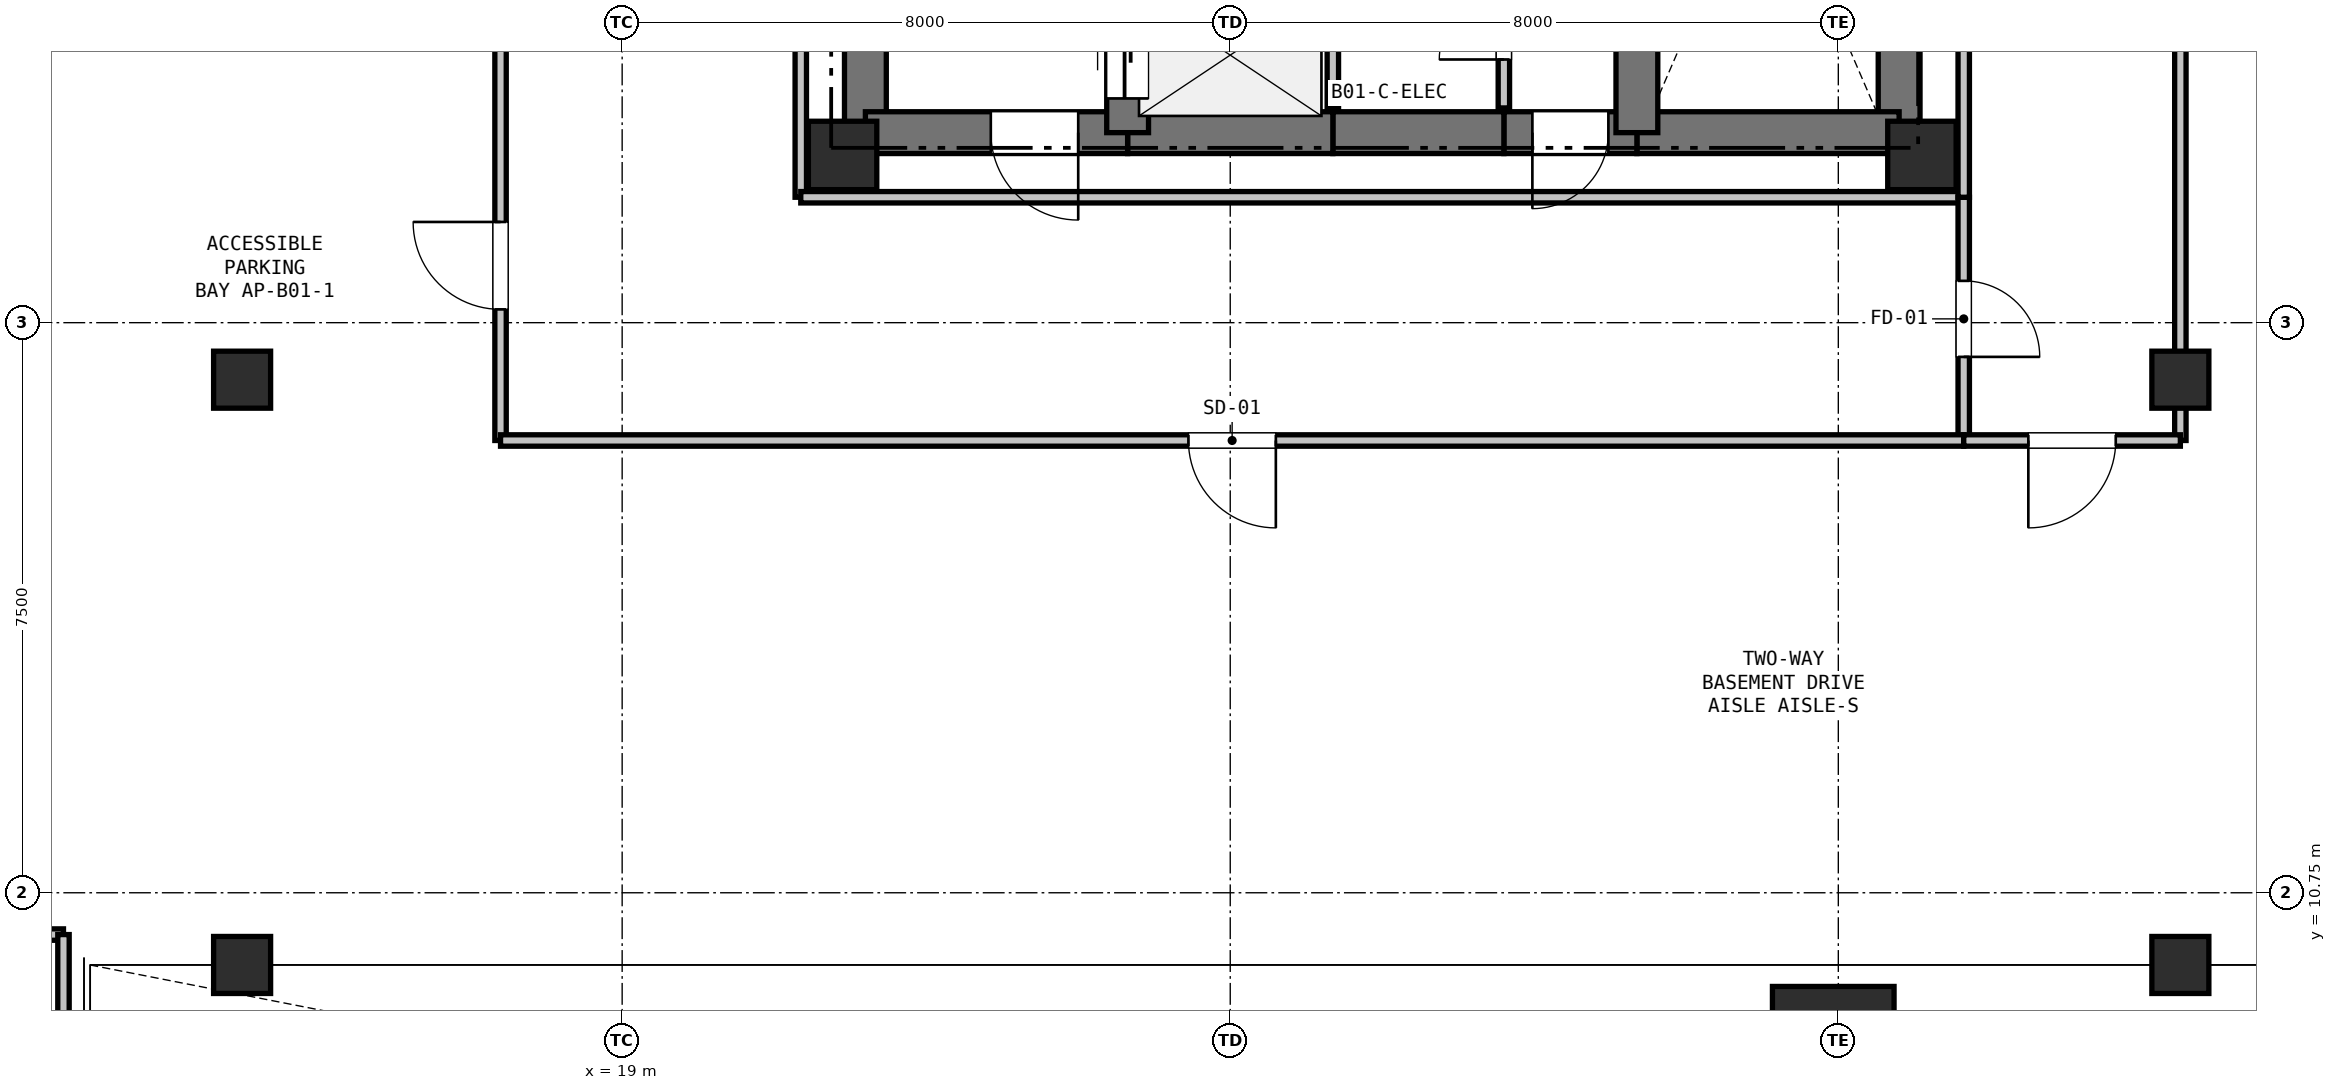
"""IFC4 building model, lengths in metres.
Left out: names, types, materials, properties, quantities, classifications, styles, units other than length and angle.
Written with IfcOpenShell. Run it as: python <this file> out.ifc"""

import sys

from ifc_helpers import new_model, si_unit, direction, frame, frame_2d, origin, origin_2d, place, context, subcontext, project, spatial, rectangle, hollow_rectangle, extrude, element, fill, save


model = new_model("IFC4")
c1 = context("Model", 3, precision=1e-05, world=origin(), true_north=direction((0.0, 1.0)))
c2 = subcontext(c1, "Body", "Model", "MODEL_VIEW")
j1 = project(units=[si_unit("LENGTHUNIT", "METRE"), si_unit("PLANEANGLEUNIT", "RADIAN")], contexts=[c1])
p1 = place(None, origin())
s1 = spatial("IfcSite", under=j1, at=p1, CompositionType="ELEMENT")
p2 = place(p1, origin())
s2 = spatial("IfcBuilding", under=s1, at=p2, CompositionType="ELEMENT")
p3 = place(p2, frame((0.0, 0.0, -4.5)))
s3 = spatial("IfcBuildingStorey", under=s2, at=p3, CompositionType="ELEMENT", Elevation=-4.5)
p4 = place(p3, frame((34.933, 8.717, 0.0), z_axis=(0.0, 0.0, 1.0), x_axis=(1.0, 0.0, 0.0)))
e1 = element("IfcColumn", 1, at=p4, inside=s3, PredefinedType="COLUMN", context=c2, shape_type="SweptSolid", body=[
    extrude(hollow_rectangle(XDim=1.6, YDim=1.6, WallThickness=0.04, at=origin_2d()), origin(), (0.0, 0.0, 1.0), 4.5),
])
for number, where, z_axis, x_axis in (
    (2, (14.0, 9.8, 0.0), (0.0, 0.0, 1.0), (1.0, 0.0, 0.0)),
    (3, (14.0, 17.5, 0.0), (0.0, 0.0, 1.0), (1.0, 0.0, 0.0)),
    (4, (39.5, 9.8, 0.0), (0.0, 0.0, 1.0), (1.0, 0.0, 0.0)),
    (5, (39.5, 17.5, 0.0), (0.0, 0.0, 1.0), (1.0, 0.0, 0.0)),
):
    element("IfcColumn", number, at=place(p3, frame(where, z_axis=z_axis, x_axis=x_axis)), inside=s3, PredefinedType="COLUMN", context=c2, shape_type="SweptSolid", body=[
        extrude(rectangle(XDim=0.75, YDim=0.75, at=origin_2d()), origin(), (0.0, 0.0, 1.0), 4.5),
    ])
for number, where, z_axis, x_axis in (
    (6, (21.9, 20.45, 0.0), (0.0, 0.0, 1.0), (1.0, 0.0, 0.0)),
    (7, (36.1, 20.45, 0.0), (0.0, 0.0, 1.0), (1.0, 0.0, 0.0)),
):
    element("IfcColumn", number, at=place(p3, frame(where, z_axis=z_axis, x_axis=x_axis)), inside=s3, PredefinedType="COLUMN", context=c2, shape_type="SweptSolid", body=[
        extrude(rectangle(XDim=0.9, YDim=0.9, at=origin_2d()), origin(), (0.0, 0.0, 1.0), 4.5),
    ])
p5 = place(p3, frame((22.2, 20.75, 0.0), z_axis=(0.0, 0.0, 1.0), x_axis=(0.0, 1.0, 0.0)))
e8 = element("IfcWall", 8, at=p5, inside=s3, PredefinedType="SHEAR", context=c2, shape_type="SweptSolid", body=[
    extrude(rectangle(XDim=4.65, YDim=0.55, at=frame_2d((2.325, 0.0))), origin(), (0.0, 0.0, 1.0), 4.2),
])
p6 = place(p3, frame((35.8, 28.1, 0.0), z_axis=(0.0, 0.0, 1.0), x_axis=(0.0, -1.0, 0.0)))
e9 = element("IfcWall", 9, at=p6, inside=s3, PredefinedType="SHEAR", context=c2, shape_type="SweptSolid", body=[
    extrude(rectangle(XDim=7.35, YDim=0.55, at=frame_2d((3.675, 0.0))), origin(), (0.0, 0.0, 1.0), 4.2),
])
p7 = place(p3, frame((35.8, 20.75, 0.0), z_axis=(0.0, 0.0, 1.0), x_axis=(-1.0, 0.0, 0.0)))
e10 = element("IfcWall", 10, at=p7, inside=s3, PredefinedType="SHEAR", context=c2, shape_type="SweptSolid", body=[
    extrude(rectangle(XDim=3.45, YDim=0.55, at=frame_2d((1.725, 0.0))), origin(), (0.0, 0.0, 1.0), 4.2),
])
p8 = place(p3, frame((32.35, 20.75, 0.0), z_axis=(0.0, 0.0, 1.0), x_axis=(-1.0, 0.0, 0.0)))
e11 = element("IfcWall", 11, at=p8, inside=s3, PredefinedType="SHEAR", context=c2, shape_type="SweptSolid", body=[
    extrude(rectangle(XDim=1.75, YDim=0.55, at=frame_2d((0.875, 0.0))), origin(), (0.0, 0.0, 1.0), 4.2),
])
p9 = place(p8, frame((0.375, 0.0, 0.0)))
e12 = element("IfcOpeningElement", 12, at=p9, cuts=e11, PredefinedType="OPENING", context=c2, shape_type="SweptSolid", body=[
    extrude(rectangle(XDim=1.0, YDim=2.15, at=frame_2d((0.5, 1.075))), frame((0.0, 0.285, 0.0), z_axis=(0.0, -1.0, 0.0), x_axis=(1.0, 0.0, 0.0)), (0.0, 0.0, 1.0), 0.57),
])
p10 = place(p3, frame((30.6, 20.75, 0.0), z_axis=(0.0, 0.0, 1.0), x_axis=(-1.0, 0.0, 0.0)))
e13 = element("IfcWall", 13, at=p10, inside=s3, PredefinedType="SHEAR", context=c2, shape_type="SweptSolid", body=[
    extrude(rectangle(XDim=2.25, YDim=0.55, at=frame_2d((1.125, 0.0))), origin(), (0.0, 0.0, 1.0), 4.2),
])
p11 = place(p3, frame((28.35, 20.75, 0.0), z_axis=(0.0, 0.0, 1.0), x_axis=(-1.0, 0.0, 0.0)))
e14 = element("IfcWall", 14, at=p11, inside=s3, PredefinedType="SHEAR", context=c2, shape_type="SweptSolid", body=[
    extrude(rectangle(XDim=2.7, YDim=0.55, at=frame_2d((1.35, 0.0))), origin(), (0.0, 0.0, 1.0), 4.2),
])
p12 = place(p3, frame((25.65, 20.75, 0.0), z_axis=(0.0, 0.0, 1.0), x_axis=(-1.0, 0.0, 0.0)))
e15 = element("IfcWall", 15, at=p12, inside=s3, PredefinedType="SHEAR", context=c2, shape_type="SweptSolid", body=[
    extrude(rectangle(XDim=3.45, YDim=0.55, at=frame_2d((1.725, 0.0))), origin(), (0.0, 0.0, 1.0), 4.2),
])
p13 = place(p12, frame((0.65, 0.0, 0.0)))
e16 = element("IfcOpeningElement", 16, at=p13, cuts=e15, PredefinedType="OPENING", context=c2, shape_type="SweptSolid", body=[
    extrude(rectangle(XDim=1.15, YDim=2.15, at=frame_2d((0.575, 1.075))), frame((0.0, 0.285, 0.0), z_axis=(0.0, -1.0, 0.0), x_axis=(1.0, 0.0, 0.0)), (0.0, 0.0, 1.0), 0.57),
])
p14 = place(p3, frame((25.65, 20.75, 0.0), z_axis=(0.0, 0.0, 1.0), x_axis=(0.0, 1.0, 0.0)))
e17 = element("IfcWall", 17, at=p14, inside=s3, PredefinedType="SHEAR", context=c2, shape_type="SweptSolid", body=[
    extrude(rectangle(XDim=2.0, YDim=0.55, at=frame_2d((1.0, 0.0))), origin(), (0.0, 0.0, 1.0), 4.2),
])
p15 = place(p14, frame((0.45, 0.0, 0.0)))
e18 = element("IfcOpeningElement", 18, at=p15, cuts=e17, PredefinedType="OPENING", context=c2, shape_type="SweptSolid", body=[
    extrude(rectangle(XDim=1.1, YDim=2.15, at=frame_2d((0.55, 1.075))), frame((0.0, 0.285, 0.0), z_axis=(0.0, -1.0, 0.0), x_axis=(1.0, 0.0, 0.0)), (0.0, 0.0, 1.0), 0.57),
])
p16 = place(p3, frame((32.35, 20.75, 0.0), z_axis=(0.0, 0.0, 1.0), x_axis=(0.0, 1.0, 0.0)))
e19 = element("IfcWall", 19, at=p16, inside=s3, PredefinedType="SHEAR", context=c2, shape_type="SweptSolid", body=[
    extrude(rectangle(XDim=4.8, YDim=0.55, at=frame_2d((2.4, 0.0))), origin(), (0.0, 0.0, 1.0), 4.2),
])
p17 = place(p3, frame((28.35, 23.2, 0.0), z_axis=(0.0, 0.0, 1.0), x_axis=(0.0, -1.0, 0.0)))
e20 = element("IfcWall", 20, at=p17, inside=s3, PredefinedType="PARTITIONING", context=c2, shape_type="SweptSolid", body=[
    extrude(rectangle(XDim=2.125, YDim=0.15, at=frame_2d((1.062, 0.0))), origin(), (0.0, 0.0, 1.0), 4.2),
])
p18 = place(p3, frame((30.6, 21.075, 0.0), z_axis=(0.0, 0.0, 1.0), x_axis=(0.0, 1.0, 0.0)))
e21 = element("IfcWall", 21, at=p18, inside=s3, PredefinedType="PARTITIONING", context=c2, shape_type="SweptSolid", body=[
    extrude(rectangle(XDim=2.125, YDim=0.15, at=frame_2d((1.062, 0.0))), origin(), (0.0, 0.0, 1.0), 4.2),
])
p19 = place(p18, frame((0.637, 0.0, 0.0)))
e22 = element("IfcOpeningElement", 22, at=p19, cuts=e21, PredefinedType="OPENING", context=c2, shape_type="SweptSolid", body=[
    extrude(rectangle(XDim=0.85, YDim=2.1, at=frame_2d((0.425, 1.05))), frame((0.0, 0.085, 0.0), z_axis=(0.0, -1.0, 0.0), x_axis=(1.0, 0.0, 0.0)), (0.0, 0.0, 1.0), 0.17),
])
p20 = place(p3, frame((17.4, 16.7, 0.0), z_axis=(0.0, 0.0, 1.0), x_axis=(0.0, 1.0, 0.0)))
e23 = element("IfcWall", 23, at=p20, inside=s3, PredefinedType="PARTITIONING", context=c2, shape_type="SweptSolid", body=[
    extrude(rectangle(XDim=18.7, YDim=0.15, at=frame_2d((9.35, 0.0))), origin(), (0.0, 0.0, 1.0), 4.2),
])
p21 = place(p20, frame((1.725, 0.0, 0.0)))
e24 = element("IfcOpeningElement", 24, at=p21, cuts=e23, PredefinedType="OPENING", context=c2, shape_type="SweptSolid", body=[
    extrude(rectangle(XDim=1.15, YDim=2.15, at=frame_2d((0.575, 1.075))), frame((0.0, 0.085, 0.0), z_axis=(0.0, -1.0, 0.0), x_axis=(1.0, 0.0, 0.0)), (0.0, 0.0, 1.0), 0.17),
])
p22 = place(p20, frame((5.347, 0.0, 0.0)))
e25 = element("IfcOpeningElement", 25, at=p22, cuts=e23, PredefinedType="OPENING", context=c2, shape_type="SweptSolid", body=[
    extrude(rectangle(XDim=1.15, YDim=2.15, at=frame_2d((0.575, 1.075))), frame((0.0, 0.085, 0.0), z_axis=(0.0, -1.0, 0.0), x_axis=(1.0, 0.0, 0.0)), (0.0, 0.0, 1.0), 0.17),
])
p23 = place(p3, frame((21.35, 25.25, 0.0), z_axis=(0.0, 0.0, 1.0), x_axis=(0.0, -1.0, 0.0)))
e26 = element("IfcWall", 26, at=p23, inside=s3, PredefinedType="PARTITIONING", context=c2, shape_type="SweptSolid", body=[
    extrude(rectangle(XDim=5.35, YDim=0.15, at=frame_2d((2.675, 0.0))), origin(), (0.0, 0.0, 1.0), 4.2),
])
p24 = place(p3, frame((21.35, 19.9, 0.0), z_axis=(0.0, 0.0, 1.0), x_axis=(1.0, 0.0, 0.0)))
e27 = element("IfcWall", 27, at=p24, inside=s3, PredefinedType="PARTITIONING", context=c2, shape_type="SweptSolid", body=[
    extrude(rectangle(XDim=15.3, YDim=0.15, at=frame_2d((7.65, 0.0))), origin(), (0.0, 0.0, 1.0), 4.2),
])
p25 = place(p3, frame((36.65, 19.9, 0.0), z_axis=(0.0, 0.0, 1.0), x_axis=(0.0, -1.0, 0.0)))
e28 = element("IfcWall", 28, at=p25, inside=s3, PredefinedType="PARTITIONING", context=c2, shape_type="SweptSolid", body=[
    extrude(rectangle(XDim=3.2, YDim=0.15, at=frame_2d((1.6, 0.0))), origin(), (0.0, 0.0, 1.0), 4.2),
])
p26 = place(p25, frame((1.1, 0.0, 0.0)))
e29 = element("IfcOpeningElement", 29, at=p26, cuts=e28, PredefinedType="OPENING", context=c2, shape_type="SweptSolid", body=[
    extrude(rectangle(XDim=1.0, YDim=2.15, at=frame_2d((0.5, 1.075))), frame((0.0, 0.085, 0.0), z_axis=(0.0, -1.0, 0.0), x_axis=(1.0, 0.0, 0.0)), (0.0, 0.0, 1.0), 0.17),
])
p27 = place(p3, frame((36.65, 16.7, 0.0), z_axis=(0.0, 0.0, 1.0), x_axis=(-1.0, 0.0, 0.0)))
e30 = element("IfcWall", 30, at=p27, inside=s3, PredefinedType="PARTITIONING", context=c2, shape_type="SweptSolid", body=[
    extrude(rectangle(XDim=19.25, YDim=0.15, at=frame_2d((9.625, 0.0))), origin(), (0.0, 0.0, 1.0), 4.2),
])
p28 = place(p27, frame((9.05, 0.0, 0.0)))
e31 = element("IfcOpeningElement", 31, at=p28, cuts=e30, PredefinedType="OPENING", context=c2, shape_type="SweptSolid", body=[
    extrude(rectangle(XDim=1.15, YDim=2.15, at=frame_2d((0.575, 1.075))), frame((0.0, 0.085, 0.0), z_axis=(0.0, -1.0, 0.0), x_axis=(1.0, 0.0, 0.0)), (0.0, 0.0, 1.0), 0.17),
])
p29 = place(p3, frame((39.5, 36.8, 0.0), z_axis=(0.0, 0.0, 1.0), x_axis=(0.0, -1.0, 0.0)))
e32 = element("IfcWall", 32, at=p29, inside=s3, PredefinedType="PARTITIONING", context=c2, shape_type="SweptSolid", body=[
    extrude(rectangle(XDim=20.1, YDim=0.15, at=frame_2d((10.05, 0.0))), origin(), (0.0, 0.0, 1.0), 4.2),
])
p30 = place(p29, frame((10.884, 0.0, 0.0)))
e33 = element("IfcOpeningElement", 33, at=p30, cuts=e32, PredefinedType="OPENING", context=c2, shape_type="SweptSolid", body=[
    extrude(rectangle(XDim=1.15, YDim=2.15, at=frame_2d((0.575, 1.075))), frame((0.0, 0.085, 0.0), z_axis=(0.0, -1.0, 0.0), x_axis=(1.0, 0.0, 0.0)), (0.0, 0.0, 1.0), 0.17),
])
p31 = place(p3, frame((39.5, 16.7, 0.0), z_axis=(0.0, 0.0, 1.0), x_axis=(-1.0, 0.0, 0.0)))
e34 = element("IfcWall", 34, at=p31, inside=s3, PredefinedType="PARTITIONING", context=c2, shape_type="SweptSolid", body=[
    extrude(rectangle(XDim=2.85, YDim=0.15, at=frame_2d((1.425, 0.0))), origin(), (0.0, 0.0, 1.0), 4.2),
])
p32 = place(p31, frame((0.85, 0.0, 0.0)))
e35 = element("IfcOpeningElement", 35, at=p32, cuts=e34, PredefinedType="OPENING", context=c2, shape_type="SweptSolid", body=[
    extrude(rectangle(XDim=1.15, YDim=2.15, at=frame_2d((0.575, 1.075))), frame((0.0, 0.085, 0.0), z_axis=(0.0, -1.0, 0.0), x_axis=(1.0, 0.0, 0.0)), (0.0, 0.0, 1.0), 0.17),
])
p33 = place(p3, frame((36.65, 19.9, 0.0), z_axis=(0.0, 0.0, 1.0), x_axis=(0.0, 1.0, 0.0)))
e36 = element("IfcWall", 36, at=p33, inside=s3, PredefinedType="PARTITIONING", context=c2, shape_type="SweptSolid", body=[
    extrude(rectangle(XDim=13.7, YDim=0.15, at=frame_2d((6.85, 0.0))), origin(), (0.0, 0.0, 1.0), 4.2),
])
p34 = place(p3, frame((6.0, 10.2, 0.0), z_axis=(0.0, 0.0, 1.0), x_axis=(1.0, 0.0, 0.0)))
e37 = element("IfcWall", 37, at=p34, inside=s3, PredefinedType="PARTITIONING", context=c2, shape_type="SweptSolid", body=[
    extrude(rectangle(XDim=5.65, YDim=0.15, at=frame_2d((2.825, 0.0))), origin(), (0.0, 0.0, 1.0), 4.2),
])
p35 = place(p34, frame((2.25, 0.0, 0.0)))
e38 = element("IfcOpeningElement", 38, at=p35, cuts=e37, PredefinedType="OPENING", context=c2, shape_type="SweptSolid", body=[
    extrude(rectangle(XDim=1.15, YDim=2.15, at=frame_2d((0.575, 1.075))), frame((0.0, 0.085, 0.0), z_axis=(0.0, -1.0, 0.0), x_axis=(1.0, 0.0, 0.0)), (0.0, 0.0, 1.0), 0.17),
])
p36 = place(p3, frame((11.65, 10.2, 0.0), z_axis=(0.0, 0.0, 1.0), x_axis=(0.0, -1.0, 0.0)))
e39 = element("IfcWall", 39, at=p36, inside=s3, PredefinedType="PARTITIONING", context=c2, shape_type="SweptSolid", body=[
    extrude(rectangle(XDim=7.0, YDim=0.15, at=frame_2d((3.5, 0.0))), origin(), (0.0, 0.0, 1.0), 4.2),
])
p37 = place(p9, origin())
e40 = element("IfcDoor", 40, at=p37, inside=s3, OperationType="SINGLE_SWING_RIGHT", PredefinedType="DOOR", context=c2, shape_type="SweptSolid", body=[
    extrude(rectangle(XDim=1.0, YDim=2.15, at=frame_2d((0.5, 1.075))), frame((0.0, 0.025, 0.0), z_axis=(0.0, -1.0, 0.0), x_axis=(1.0, 0.0, 0.0)), (0.0, 0.0, 1.0), 0.05),
])
fill(e12, e40)
p38 = place(p15, origin())
e41 = element("IfcDoor", 41, at=p38, inside=s3, OperationType="SLIDING_TO_LEFT", PredefinedType="DOOR", context=c2, shape_type="SweptSolid", body=[
    extrude(rectangle(XDim=1.1, YDim=2.15, at=frame_2d((0.55, 1.075))), frame((0.0, 0.025, 0.0), z_axis=(0.0, -1.0, 0.0), x_axis=(1.0, 0.0, 0.0)), (0.0, 0.0, 1.0), 0.05),
])
fill(e18, e41)
p39 = place(p13, origin())
e42 = element("IfcDoor", 42, at=p39, inside=s3, OperationType="SINGLE_SWING_LEFT", PredefinedType="DOOR", context=c2, shape_type="SweptSolid", body=[
    extrude(rectangle(XDim=1.15, YDim=2.15, at=frame_2d((0.575, 1.075))), frame((0.0, 0.025, 0.0), z_axis=(0.0, -1.0, 0.0), x_axis=(1.0, 0.0, 0.0)), (0.0, 0.0, 1.0), 0.05),
])
fill(e16, e42)
p40 = place(p19, origin())
e43 = element("IfcDoor", 43, at=p40, inside=s3, OperationType="SINGLE_SWING_LEFT", PredefinedType="DOOR", context=c2, shape_type="SweptSolid", body=[
    extrude(rectangle(XDim=0.85, YDim=2.1, at=frame_2d((0.425, 1.05))), frame((0.0, 0.025, 0.0), z_axis=(0.0, -1.0, 0.0), x_axis=(1.0, 0.0, 0.0)), (0.0, 0.0, 1.0), 0.05),
])
fill(e22, e43)
p41 = place(p26, origin())
e44 = element("IfcDoor", 44, at=p41, inside=s3, OperationType="SINGLE_SWING_RIGHT", PredefinedType="DOOR", context=c2, shape_type="SweptSolid", body=[
    extrude(rectangle(XDim=1.0, YDim=2.15, at=frame_2d((0.5, 1.075))), frame((0.0, 0.025, 0.0), z_axis=(0.0, -1.0, 0.0), x_axis=(1.0, 0.0, 0.0)), (0.0, 0.0, 1.0), 0.05),
])
fill(e29, e44)
p42 = place(p28, origin())
e45 = element("IfcDoor", 45, at=p42, inside=s3, OperationType="SINGLE_SWING_LEFT", PredefinedType="DOOR", context=c2, shape_type="SweptSolid", body=[
    extrude(rectangle(XDim=1.15, YDim=2.15, at=frame_2d((0.575, 1.075))), frame((0.0, 0.025, 0.0), z_axis=(0.0, -1.0, 0.0), x_axis=(1.0, 0.0, 0.0)), (0.0, 0.0, 1.0), 0.05),
])
fill(e31, e45)
p43 = place(p21, origin())
e46 = element("IfcDoor", 46, at=p43, inside=s3, OperationType="SINGLE_SWING_RIGHT", PredefinedType="DOOR", context=c2, shape_type="SweptSolid", body=[
    extrude(rectangle(XDim=1.15, YDim=2.15, at=frame_2d((0.575, 1.075))), frame((0.0, 0.025, 0.0), z_axis=(0.0, -1.0, 0.0), x_axis=(1.0, 0.0, 0.0)), (0.0, 0.0, 1.0), 0.05),
])
fill(e24, e46)
p44 = place(p32, origin())
e47 = element("IfcDoor", 47, at=p44, inside=s3, OperationType="SINGLE_SWING_RIGHT", PredefinedType="DOOR", context=c2, shape_type="SweptSolid", body=[
    extrude(rectangle(XDim=1.15, YDim=2.15, at=frame_2d((0.575, 1.075))), frame((0.0, 0.025, 0.0), z_axis=(0.0, -1.0, 0.0), x_axis=(1.0, 0.0, 0.0)), (0.0, 0.0, 1.0), 0.05),
])
fill(e35, e47)
save(model, sys.argv[1])
